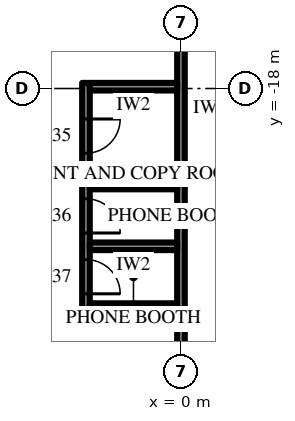
"""IFC4 building model, lengths in metres.
Left out: names, types, materials, properties, quantities, classifications, styles, units other than length and angle.
Written with IfcOpenShell. Run it as: python <this file> out.ifc"""

import sys

from ifc_helpers import new_model, si_unit, direction, frame, frame_2d, origin, place, context, subcontext, project, spatial, rectangle, extrude, element, fill, save


model = new_model("IFC4")
c1 = context("Model", 3, precision=1e-05, world=origin(), true_north=direction((0.0, 1.0)))
c2 = subcontext(c1, "Body", "Model", "MODEL_VIEW")
j1 = project(units=[si_unit("LENGTHUNIT", "METRE"), si_unit("PLANEANGLEUNIT", "RADIAN")], contexts=[c1])
p1 = place(None, origin())
s1 = spatial("IfcSite", under=j1, at=p1, CompositionType="ELEMENT")
p2 = place(p1, origin())
s2 = spatial("IfcBuilding", under=s1, at=p2, CompositionType="ELEMENT")
p3 = place(p2, frame((0.0, 0.0, 270.1)))
s3 = spatial("IfcBuildingStorey", under=s2, at=p3, CompositionType="ELEMENT", Elevation=270.1)
p4 = place(p3, frame((0.0, -12.3, 0.0), z_axis=(0.0, 0.0, 1.0), x_axis=(0.0, -1.0, 0.0)))
e1 = element("IfcWall", 1, at=p4, inside=s3, PredefinedType="PARTITIONING", context=c2, shape_type="SweptSolid", body=[
    extrude(rectangle(XDim=15.55, YDim=0.2, at=frame_2d((7.775, 0.0))), origin(), (0.0, 0.0, 1.0), 2.992),
])
p5 = place(p4, frame((1.055, 0.0, 0.0)))
e2 = element("IfcOpeningElement", 2, at=p5, cuts=e1, PredefinedType="OPENING", context=c2, shape_type="SweptSolid", body=[
    extrude(rectangle(XDim=1.0, YDim=2.2, at=frame_2d((0.5, 1.1))), frame((0.0, 0.11, 0.0), z_axis=(0.0, -1.0, 0.0), x_axis=(1.0, 0.0, 0.0)), (0.0, 0.0, 1.0), 0.22),
])
p6 = place(p3, frame((-2.5, -17.853, 0.0), z_axis=(0.0, 0.0, 1.0), x_axis=(0.0, -1.0, 0.0)))
e3 = element("IfcWall", 3, at=p6, inside=s3, PredefinedType="PARTITIONING", context=c2, shape_type="SweptSolid", body=[
    extrude(rectangle(XDim=6.0, YDim=0.2, at=frame_2d((3.0, 0.0))), origin(), (0.0, 0.0, 1.0), 4.0),
])
p7 = place(p6, frame((0.95, 0.0, 0.0)))
e4 = element("IfcOpeningElement", 4, at=p7, cuts=e3, PredefinedType="OPENING", context=c2, shape_type="SweptSolid", body=[
    extrude(rectangle(XDim=0.9, YDim=2.2, at=frame_2d((0.45, 1.1))), frame((0.0, 0.11, 0.0), z_axis=(0.0, -1.0, 0.0), x_axis=(1.0, 0.0, 0.0)), (0.0, 0.0, 1.0), 0.22),
])
p8 = place(p6, frame((3.05, 0.0, 0.0)))
e5 = element("IfcOpeningElement", 5, at=p8, cuts=e3, PredefinedType="OPENING", context=c2, shape_type="SweptSolid", body=[
    extrude(rectangle(XDim=0.9, YDim=2.2, at=frame_2d((0.45, 1.1))), frame((0.0, 0.11, 0.0), z_axis=(0.0, -1.0, 0.0), x_axis=(1.0, 0.0, 0.0)), (0.0, 0.0, 1.0), 0.22),
])
p9 = place(p6, frame((4.65, 0.0, 0.0)))
e6 = element("IfcOpeningElement", 6, at=p9, cuts=e3, PredefinedType="OPENING", context=c2, shape_type="SweptSolid", body=[
    extrude(rectangle(XDim=0.9, YDim=2.2, at=frame_2d((0.45, 1.1))), frame((0.0, 0.11, 0.0), z_axis=(0.0, -1.0, 0.0), x_axis=(1.0, 0.0, 0.0)), (0.0, 0.0, 1.0), 0.22),
])
for number, where, z_axis, x_axis in (
    (7, (-0.1, -17.952, 0.0), (0.0, 0.0, 1.0), (-1.0, 0.0, 0.0)),
    (8, (-0.1, -20.552, 0.0), (0.0, 0.0, 1.0), (-1.0, 0.0, 0.0)),
    (9, (-0.1, -22.153, 0.0), (0.0, 0.0, 1.0), (-1.0, 0.0, 0.0)),
    (10, (-0.1, -23.752, 0.0), (0.0, 0.0, 1.0), (-1.0, 0.0, 0.0)),
):
    element("IfcWall", number, at=place(p3, frame(where, z_axis=z_axis, x_axis=x_axis)), inside=s3, PredefinedType="PARTITIONING", context=c2, shape_type="SweptSolid", body=[
        extrude(rectangle(XDim=2.3, YDim=0.2, at=frame_2d((1.15, 0.0))), origin(), (0.0, 0.0, 1.0), 4.0),
    ])
p10 = place(p7, origin())
e11 = element("IfcDoor", 11, at=p10, inside=s3, OperationType="SINGLE_SWING_RIGHT", PredefinedType="DOOR", context=c2, shape_type="SweptSolid", body=[
    extrude(rectangle(XDim=0.9, YDim=2.2, at=frame_2d((0.45, 1.1))), frame((0.0, 0.025, 0.0), z_axis=(0.0, -1.0, 0.0), x_axis=(1.0, 0.0, 0.0)), (0.0, 0.0, 1.0), 0.05),
])
fill(e4, e11)
p11 = place(p8, origin())
e12 = element("IfcDoor", 12, at=p11, inside=s3, OperationType="SINGLE_SWING_LEFT", PredefinedType="DOOR", context=c2, shape_type="SweptSolid", body=[
    extrude(rectangle(XDim=0.9, YDim=2.2, at=frame_2d((0.45, 1.1))), frame((0.0, 0.025, 0.0), z_axis=(0.0, -1.0, 0.0), x_axis=(1.0, 0.0, 0.0)), (0.0, 0.0, 1.0), 0.05),
])
fill(e5, e12)
p12 = place(p9, origin())
e13 = element("IfcDoor", 13, at=p12, inside=s3, OperationType="SINGLE_SWING_LEFT", PredefinedType="DOOR", context=c2, shape_type="SweptSolid", body=[
    extrude(rectangle(XDim=0.9, YDim=2.2, at=frame_2d((0.45, 1.1))), frame((0.0, 0.025, 0.0), z_axis=(0.0, -1.0, 0.0), x_axis=(1.0, 0.0, 0.0)), (0.0, 0.0, 1.0), 0.05),
])
fill(e6, e13)
save(model, sys.argv[1])
